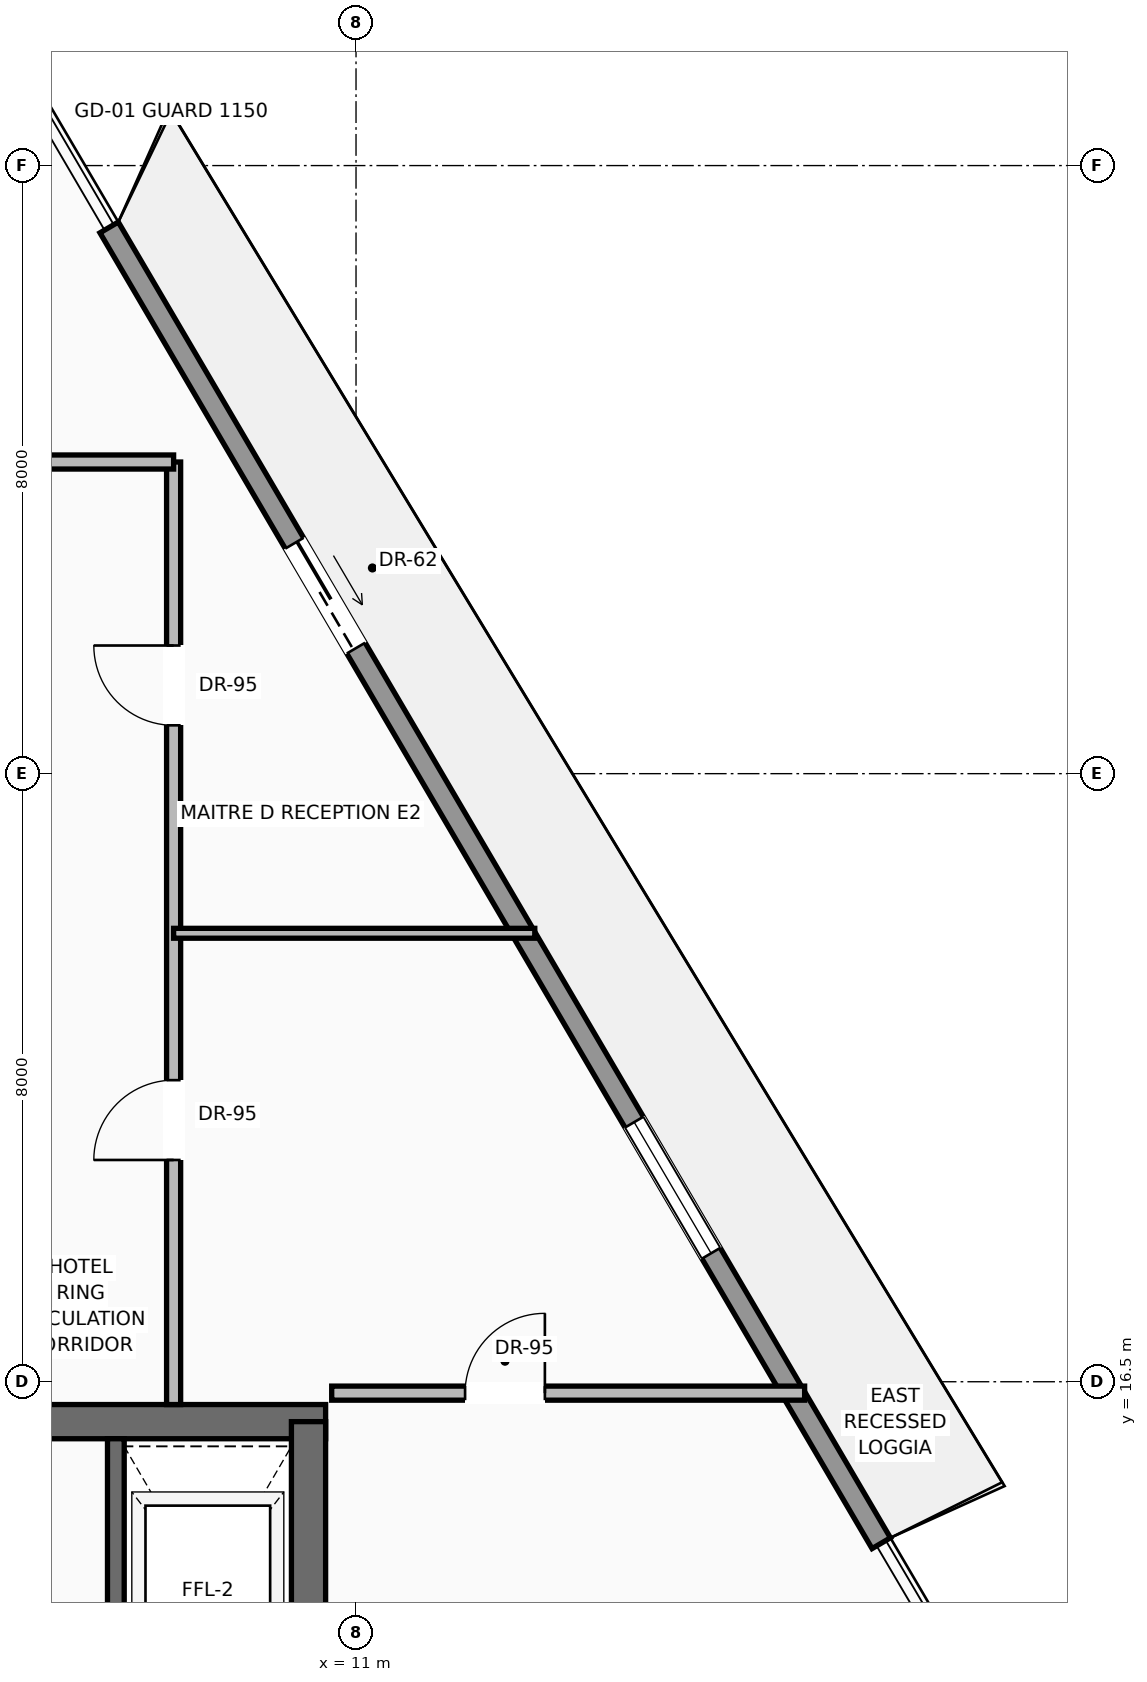
"""IFC4 building model, lengths in metres.
Left out: names, types, materials, properties, quantities, classifications, styles, units other than length and angle.
Written with IfcOpenShell. Run it as: python <this file> out.ifc"""

import sys

from ifc_helpers import new_model, si_unit, direction, frame, frame_2d, origin, place, context, subcontext, project, spatial, rectangle, extrude, source, transform, mapped, element, fill, save


model = new_model("IFC4")
c1 = context("Model", 3, precision=1e-05, world=origin(), true_north=direction((0.0, 1.0)))
c2 = subcontext(c1, "Body", "Model", "MODEL_VIEW")
j1 = project(units=[si_unit("LENGTHUNIT", "METRE"), si_unit("PLANEANGLEUNIT", "RADIAN")], contexts=[c1])
p1 = place(None, origin())
s1 = spatial("IfcSite", under=j1, at=p1, CompositionType="ELEMENT")
p2 = place(p1, origin())
s2 = spatial("IfcBuilding", under=s1, at=p2, CompositionType="ELEMENT")
p3 = place(p2, frame((0.0, 0.0, 283.35)))
s3 = spatial("IfcBuildingStorey", under=s2, at=p3, CompositionType="ELEMENT", Elevation=283.35)
p4 = place(p3, frame((-10.6, 15.975, 0.0), z_axis=(0.0, 0.0, 1.0), x_axis=(1.0, 0.0, 0.0)))
e1 = element("IfcWall", 1, at=p4, inside=s3, PredefinedType="SHEAR", context=c2, shape_type="SweptSolid", body=[
    extrude(rectangle(XDim=21.2, YDim=0.45, at=frame_2d((10.6, 0.0))), origin(), (0.0, 0.0, 1.0), 3.24),
])
p5 = place(p4, frame((3.17, 0.0, 0.0)))
e2 = element("IfcOpeningElement", 2, at=p5, cuts=e1, PredefinedType="OPENING", context=c2, shape_type="SweptSolid", body=[
    extrude(rectangle(XDim=1.3, YDim=2.3, at=frame_2d((0.65, 1.15))), frame((0.0, 0.235, 0.0), z_axis=(0.0, -1.0, 0.0), x_axis=(1.0, 0.0, 0.0)), (0.0, 0.0, 1.0), 0.47),
])
p6 = place(p4, frame((9.6, 0.0, 0.0)))
e3 = element("IfcOpeningElement", 3, at=p6, cuts=e1, PredefinedType="OPENING", context=c2, shape_type="SweptSolid", body=[
    extrude(rectangle(XDim=2.0, YDim=2.4, at=frame_2d((1.0, 1.2))), frame((0.0, 0.235, 0.0), z_axis=(0.0, -1.0, 0.0), x_axis=(1.0, 0.0, 0.0)), (0.0, 0.0, 1.0), 0.47),
])
p7 = place(p3, frame((10.375, 0.625, 0.0), z_axis=(0.0, 0.0, 1.0), x_axis=(0.0, 1.0, 0.0)))
e4 = element("IfcWall", 4, at=p7, inside=s3, PredefinedType="SHEAR", context=c2, shape_type="SweptSolid", body=[
    extrude(rectangle(XDim=15.35, YDim=0.45, at=frame_2d((7.675, 0.0))), origin(), (0.0, 0.0, 1.0), 3.24),
])
p8 = place(p3, frame((7.752, 31.686, 0.0), z_axis=(0.0, 0.0, 1.0), x_axis=(0.506132125438, -0.862455953426, 0.0)))
e5 = element("IfcWall", 5, at=p8, inside=s3, PredefinedType="SOLIDWALL", context=c2, shape_type="SweptSolid", body=[
    extrude(rectangle(XDim=20.071, YDim=0.28, at=frame_2d((10.036, 0.0))), origin(), (0.0, 0.0, 1.0), 2.82),
])
p9 = place(p8, frame((4.817, 0.0, 0.0)))
e6 = element("IfcOpeningElement", 6, at=p9, cuts=e5, PredefinedType="OPENING", context=c2, shape_type="SweptSolid", body=[
    extrude(rectangle(XDim=1.6, YDim=2.35, at=frame_2d((0.8, 1.175))), frame((0.0, 0.15, 0.0), z_axis=(0.0, -1.0, 0.0), x_axis=(1.0, 0.0, 0.0)), (0.0, 0.0, 1.0), 0.3),
])
p10 = place(p8, frame((13.648, 0.0, 0.9)))
e7 = element("IfcOpeningElement", 7, at=p10, cuts=e5, PredefinedType="OPENING", context=c2, shape_type="SweptSolid", body=[
    extrude(rectangle(XDim=2.0, YDim=1.75, at=frame_2d((1.0, 0.875))), frame((0.0, 0.15, 0.0), z_axis=(0.0, -1.0, 0.0), x_axis=(1.0, 0.0, 0.0)), (0.0, 0.0, 1.0), 0.3),
])
p11 = place(p3, frame((7.84, 11.87, 0.0), z_axis=(0.0, 0.0, 1.0), x_axis=(0.0, 1.0, 0.0)))
e8 = element("IfcWall", 8, at=p11, inside=s3, PredefinedType="SOLIDWALL", context=c2, shape_type="SweptSolid", body=[
    extrude(rectangle(XDim=3.88, YDim=0.22, at=frame_2d((1.94, 0.0))), origin(), (0.0, 0.0, 1.0), 3.24),
])
p12 = place(p3, frame((8.6, 16.2, 0.0), z_axis=(0.0, 0.0, 1.0), x_axis=(0.0, 1.0, 0.0)))
e9 = element("IfcWall", 9, at=p12, inside=s3, PredefinedType="PARTITIONING", context=c2, shape_type="SweptSolid", body=[
    extrude(rectangle(XDim=12.4, YDim=0.185, at=frame_2d((6.2, 0.0))), origin(), (0.0, 0.0, 1.0), 3.232),
])
p13 = place(p12, frame((3.218, 0.0, 0.0)))
e10 = element("IfcOpeningElement", 10, at=p13, cuts=e9, PredefinedType="OPENING", context=c2, shape_type="SweptSolid", body=[
    extrude(rectangle(XDim=1.05, YDim=2.25, at=frame_2d((0.525, 1.125))), frame((0.0, 0.103, 0.0), z_axis=(0.0, -1.0, 0.0), x_axis=(1.0, 0.0, 0.0)), (0.0, 0.0, 1.0), 0.205),
])
p14 = place(p12, frame((8.936, 0.0, 0.0)))
e11 = element("IfcOpeningElement", 11, at=p14, cuts=e9, PredefinedType="OPENING", context=c2, shape_type="SweptSolid", body=[
    extrude(rectangle(XDim=1.05, YDim=2.25, at=frame_2d((0.525, 1.125))), frame((0.0, 0.103, 0.0), z_axis=(0.0, -1.0, 0.0), x_axis=(1.0, 0.0, 0.0)), (0.0, 0.0, 1.0), 0.205),
])
p15 = place(p3, frame((-8.05, 28.6, 0.0), z_axis=(0.0, 0.0, 1.0), x_axis=(1.0, 0.0, 0.0)))
e12 = element("IfcWall", 12, at=p15, inside=s3, PredefinedType="PARTITIONING", context=c2, shape_type="SweptSolid", body=[
    extrude(rectangle(XDim=16.65, YDim=0.185, at=frame_2d((8.325, 0.0))), origin(), (0.0, 0.0, 1.0), 3.232),
])
p16 = place(p15, frame((3.248, 0.0, 0.0)))
e13 = element("IfcOpeningElement", 13, at=p16, cuts=e12, PredefinedType="OPENING", context=c2, shape_type="SweptSolid", body=[
    extrude(rectangle(XDim=1.05, YDim=2.25, at=frame_2d((0.525, 1.125))), frame((0.0, 0.103, 0.0), z_axis=(0.0, -1.0, 0.0), x_axis=(1.0, 0.0, 0.0)), (0.0, 0.0, 1.0), 0.205),
])
p17 = place(p15, frame((7.8, 0.0, 0.0)))
e14 = element("IfcOpeningElement", 14, at=p17, cuts=e12, PredefinedType="OPENING", context=c2, shape_type="SweptSolid", body=[
    extrude(rectangle(XDim=1.05, YDim=2.25, at=frame_2d((0.525, 1.125))), frame((0.0, 0.103, 0.0), z_axis=(0.0, -1.0, 0.0), x_axis=(1.0, 0.0, 0.0)), (0.0, 0.0, 1.0), 0.205),
])
p18 = place(p15, frame((11.802, 0.0, 0.0)))
e15 = element("IfcOpeningElement", 15, at=p18, cuts=e12, PredefinedType="OPENING", context=c2, shape_type="SweptSolid", body=[
    extrude(rectangle(XDim=1.05, YDim=2.25, at=frame_2d((0.525, 1.125))), frame((0.0, 0.103, 0.0), z_axis=(0.0, -1.0, 0.0), x_axis=(1.0, 0.0, 0.0)), (0.0, 0.0, 1.0), 0.205),
])
p19 = place(p15, frame((0.802, 0.0, 0.0)))
e16 = element("IfcOpeningElement", 16, at=p19, cuts=e12, PredefinedType="OPENING", context=c2, shape_type="SweptSolid", body=[
    extrude(rectangle(XDim=1.05, YDim=2.25, at=frame_2d((0.525, 1.125))), frame((0.0, 0.103, 0.0), z_axis=(0.0, -1.0, 0.0), x_axis=(1.0, 0.0, 0.0)), (0.0, 0.0, 1.0), 0.205),
])
p20 = place(p3, frame((10.68, 16.35, 0.0), z_axis=(0.0, 0.0, 1.0), x_axis=(1.0, 0.0, 0.0)))
e17 = element("IfcWall", 17, at=p20, inside=s3, PredefinedType="PARTITIONING", context=c2, shape_type="SweptSolid", body=[
    extrude(rectangle(XDim=6.222, YDim=0.185, at=frame_2d((3.111, 0.0))), origin(), (0.0, 0.0, 1.0), 3.232),
])
p21 = place(p20, frame((1.755, 0.0, 0.0)))
e18 = element("IfcOpeningElement", 18, at=p21, cuts=e17, PredefinedType="OPENING", context=c2, shape_type="SweptSolid", body=[
    extrude(rectangle(XDim=1.05, YDim=2.25, at=frame_2d((0.525, 1.125))), frame((0.0, 0.103, 0.0), z_axis=(0.0, -1.0, 0.0), x_axis=(1.0, 0.0, 0.0)), (0.0, 0.0, 1.0), 0.205),
])
p22 = place(p3, frame((8.6, 22.4, 0.0), z_axis=(0.0, 0.0, 1.0), x_axis=(1.0, 0.0, 0.0)))
e19 = element("IfcWall", 19, at=p22, inside=s3, PredefinedType="PARTITIONING", context=c2, shape_type="SweptSolid", body=[
    extrude(rectangle(XDim=4.752, YDim=0.13, at=frame_2d((2.376, 0.0))), origin(), (0.0, 0.0, 1.0), 3.232),
])
m1 = source(origin(), c2, "Body", "SweptSolid", [
    extrude(rectangle(XDim=1.6, YDim=2.35, at=frame_2d((0.8, 1.175))), frame((0.0, 0.025, 0.0), z_axis=(0.0, -1.0, 0.0), x_axis=(1.0, 0.0, 0.0)), (0.0, 0.0, 1.0), 0.05),
])
p23 = place(p9, origin())
e20 = element("IfcDoor", 20, at=p23, inside=s3, OperationType="SLIDING_TO_RIGHT", PredefinedType="DOOR", context=c2, shape_type="MappedRepresentation", body=[
    mapped(m1, transform((0.0, 0.0, 0.0), scale=1.0)),
])
fill(e6, e20)
m2 = source(origin(), c2, "Body", "SweptSolid", [
    extrude(rectangle(XDim=2.0, YDim=1.75, at=frame_2d((1.0, 0.875))), frame((0.0, 0.03, 0.0), z_axis=(0.0, -1.0, 0.0), x_axis=(1.0, 0.0, 0.0)), (0.0, 0.0, 1.0), 0.06),
])
p24 = place(p10, origin())
e21 = element("IfcWindow", 21, at=p24, inside=s3, PartitioningType="SINGLE_PANEL", PredefinedType="WINDOW", context=c2, shape_type="MappedRepresentation", body=[
    mapped(m2, transform((0.0, 0.0, 0.0), scale=1.0)),
])
fill(e7, e21)
m3 = source(origin(), c2, "Body", "SweptSolid", [
    extrude(rectangle(XDim=1.05, YDim=2.25, at=frame_2d((0.525, 1.125))), frame((0.0, 0.025, 0.0), z_axis=(0.0, -1.0, 0.0), x_axis=(1.0, 0.0, 0.0)), (0.0, 0.0, 1.0), 0.05),
])
p25 = place(p21, origin())
e22 = element("IfcDoor", 22, at=p25, inside=s3, OperationType="SINGLE_SWING_RIGHT", PredefinedType="DOOR", context=c2, shape_type="MappedRepresentation", body=[
    mapped(m3, transform((0.0, 0.0, 0.0), scale=1.0)),
])
fill(e18, e22)
p26 = place(p13, origin())
e23 = element("IfcDoor", 23, at=p26, inside=s3, OperationType="SINGLE_SWING_LEFT", PredefinedType="DOOR", context=c2, shape_type="MappedRepresentation", body=[
    mapped(m3, transform((0.0, 0.0, 0.0), scale=1.0)),
])
fill(e10, e23)
p27 = place(p14, origin())
e24 = element("IfcDoor", 24, at=p27, inside=s3, OperationType="SINGLE_SWING_RIGHT", PredefinedType="DOOR", context=c2, shape_type="MappedRepresentation", body=[
    mapped(m3, transform((0.0, 0.0, 0.0), scale=1.0)),
])
fill(e11, e24)
save(model, sys.argv[1])
